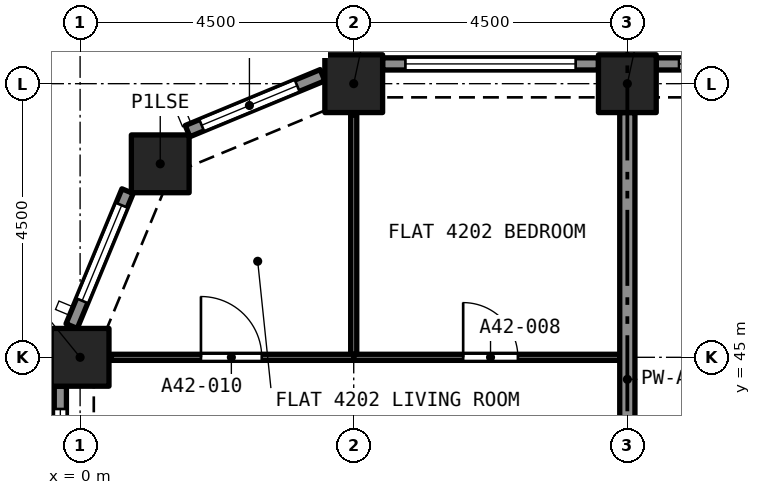
"""IFC4 building model, lengths in metres.
Left out: names, types, materials, properties, quantities, classifications, styles, units other than length and angle.
Written with IfcOpenShell. Run it as: python <this file> out.ifc"""

import sys

from ifc_helpers import new_model, si_unit, direction, frame, frame_2d, origin, origin_2d, place, context, subcontext, project, spatial, rectangle, extrude, element, fill, save


model = new_model("IFC4")
c1 = context("Model", 3, precision=1e-05, world=origin(), true_north=direction((0.0, 1.0)))
c2 = subcontext(c1, "Body", "Model", "MODEL_VIEW")
j1 = project(units=[si_unit("LENGTHUNIT", "METRE"), si_unit("PLANEANGLEUNIT", "RADIAN")], contexts=[c1])
p1 = place(None, origin())
s1 = spatial("IfcSite", under=j1, at=p1, CompositionType="ELEMENT")
p2 = place(p1, origin())
s2 = spatial("IfcBuilding", under=s1, at=p2, CompositionType="ELEMENT")
p3 = place(p2, frame((0.0, 0.0, 150.6)))
s3 = spatial("IfcBuildingStorey", under=s2, at=p3, CompositionType="ELEMENT", Elevation=150.6)
for number, where, z_axis, x_axis in (
    (1, (0.0, 45.0, 0.0), (0.0, 0.0, 1.0), (1.0, 0.0, 0.0)),
    (2, (1.318, 48.182, 0.0), (0.0, 0.0, 1.0), (1.0, 0.0, 0.0)),
    (3, (4.5, 49.5, 0.0), (0.0, 0.0, 1.0), (1.0, 0.0, 0.0)),
    (4, (9.0, 49.5, 0.0), (0.0, 0.0, 1.0), (1.0, 0.0, 0.0)),
):
    element("IfcColumn", number, at=place(p3, frame(where, z_axis=z_axis, x_axis=x_axis)), inside=s3, PredefinedType="COLUMN", context=c2, shape_type="SweptSolid", body=[
        extrude(rectangle(XDim=0.95, YDim=0.95, at=origin_2d()), origin(), (0.0, 0.0, 1.0), 4.4),
    ])
p4 = place(p3, frame((9.475, 49.825, 0.0), z_axis=(0.0, 0.0, 1.0), x_axis=(1.0, 0.0, 0.0)))
e5 = element("IfcWall", 5, at=p4, inside=s3, PredefinedType="SOLIDWALL", context=c2, shape_type="SweptSolid", body=[
    extrude(rectangle(XDim=3.55, YDim=0.2, at=frame_2d((1.775, 0.0))), origin(), (0.0, 0.0, 1.0), 4.4),
])
p5 = place(p4, frame((0.375, 0.0, 0.45)))
e6 = element("IfcOpeningElement", 6, at=p5, cuts=e5, PredefinedType="OPENING", context=c2, shape_type="SweptSolid", body=[
    extrude(rectangle(XDim=2.8, YDim=2.55, at=frame_2d((1.4, 1.275))), frame((0.0, 0.11, 0.0), z_axis=(0.0, -1.0, 0.0), x_axis=(1.0, 0.0, 0.0)), (0.0, 0.0, 1.0), 0.22),
])
p6 = place(p3, frame((4.975, 49.825, 0.0), z_axis=(0.0, 0.0, 1.0), x_axis=(1.0, 0.0, 0.0)))
e7 = element("IfcWall", 7, at=p6, inside=s3, PredefinedType="SOLIDWALL", context=c2, shape_type="SweptSolid", body=[
    extrude(rectangle(XDim=3.55, YDim=0.2, at=frame_2d((1.775, 0.0))), origin(), (0.0, 0.0, 1.0), 4.4),
])
p7 = place(p6, frame((0.375, 0.0, 0.45)))
e8 = element("IfcOpeningElement", 8, at=p7, cuts=e7, PredefinedType="OPENING", context=c2, shape_type="SweptSolid", body=[
    extrude(rectangle(XDim=2.8, YDim=2.55, at=frame_2d((1.4, 1.275))), frame((0.0, 0.11, 0.0), z_axis=(0.0, -1.0, 0.0), x_axis=(1.0, 0.0, 0.0)), (0.0, 0.0, 1.0), 0.22),
])
p8 = place(p3, frame((1.767, 48.72, 0.0), z_axis=(0.0, 0.0, 1.0), x_axis=(0.923880599843, 0.382680855588, 0.0)))
e9 = element("IfcWall", 9, at=p8, inside=s3, PredefinedType="SOLIDWALL", context=c2, shape_type="SweptSolid", body=[
    extrude(rectangle(XDim=2.403, YDim=0.2, at=frame_2d((1.201, 0.0))), origin(), (0.0, 0.0, 1.0), 4.4),
])
p9 = place(p8, frame((0.251, 0.0, 0.45)))
e10 = element("IfcOpeningElement", 10, at=p9, cuts=e9, PredefinedType="OPENING", context=c2, shape_type="SweptSolid", body=[
    extrude(rectangle(XDim=1.7, YDim=2.55, at=frame_2d((0.85, 1.275))), frame((0.0, 0.11, 0.0), z_axis=(0.0, -1.0, 0.0), x_axis=(1.0, 0.0, 0.0)), (0.0, 0.0, 1.0), 0.22),
])
p10 = place(p3, frame((-0.139, 45.513, 0.0), z_axis=(0.0, 0.0, 1.0), x_axis=(0.382680855588, 0.923880599843, 0.0)))
e11 = element("IfcWall", 11, at=p10, inside=s3, PredefinedType="SOLIDWALL", context=c2, shape_type="SweptSolid", body=[
    extrude(rectangle(XDim=2.403, YDim=0.2, at=frame_2d((1.201, 0.0))), origin(), (0.0, 0.0, 1.0), 4.4),
])
p11 = place(p10, frame((0.451, 0.0, 0.45)))
e12 = element("IfcOpeningElement", 12, at=p11, cuts=e11, PredefinedType="OPENING", context=c2, shape_type="SweptSolid", body=[
    extrude(rectangle(XDim=1.7, YDim=2.55, at=frame_2d((0.85, 1.275))), frame((0.0, 0.11, 0.0), z_axis=(0.0, -1.0, 0.0), x_axis=(1.0, 0.0, 0.0)), (0.0, 0.0, 1.0), 0.22),
])
p12 = place(p3, frame((-0.325, 40.975, 0.0), z_axis=(0.0, 0.0, 1.0), x_axis=(0.0, 1.0, 0.0)))
e13 = element("IfcWall", 13, at=p12, inside=s3, PredefinedType="SOLIDWALL", context=c2, shape_type="SweptSolid", body=[
    extrude(rectangle(XDim=3.55, YDim=0.2, at=frame_2d((1.775, 0.0))), origin(), (0.0, 0.0, 1.0), 4.4),
])
p13 = place(p12, frame((0.375, 0.0, 0.45)))
e14 = element("IfcOpeningElement", 14, at=p13, cuts=e13, PredefinedType="OPENING", context=c2, shape_type="SweptSolid", body=[
    extrude(rectangle(XDim=2.8, YDim=2.55, at=frame_2d((1.4, 1.275))), frame((0.0, 0.11, 0.0), z_axis=(0.0, -1.0, 0.0), x_axis=(1.0, 0.0, 0.0)), (0.0, 0.0, 1.0), 0.22),
])
p14 = place(p3, frame((4.5, 45.0, 0.0), z_axis=(0.0, 0.0, 1.0), x_axis=(1.0, 0.0, 0.0)))
e15 = element("IfcWall", 15, at=p14, inside=s3, PredefinedType="PARTITIONING", context=c2, shape_type="SweptSolid", body=[
    extrude(rectangle(XDim=4.375, YDim=0.1, at=frame_2d((2.188, 0.0))), origin(), (0.0, 0.0, 1.0), 4.1),
])
p15 = place(p14, frame((1.8, 0.0, 0.0)))
e16 = element("IfcOpeningElement", 16, at=p15, cuts=e15, PredefinedType="OPENING", context=c2, shape_type="SweptSolid", body=[
    extrude(rectangle(XDim=0.9, YDim=2.1, at=frame_2d((0.45, 1.05))), frame((0.0, 0.06, 0.0), z_axis=(0.0, -1.0, 0.0), x_axis=(1.0, 0.0, 0.0)), (0.0, 0.0, 1.0), 0.12),
])
p16 = place(p3, frame((4.5, 45.05, 0.0), z_axis=(0.0, 0.0, 1.0), x_axis=(0.0, 1.0, 0.0)))
e17 = element("IfcWall", 17, at=p16, inside=s3, PredefinedType="PARTITIONING", context=c2, shape_type="SweptSolid", body=[
    extrude(rectangle(XDim=3.936, YDim=0.1, at=frame_2d((1.968, 0.0))), origin(), (0.0, 0.0, 1.0), 4.1),
])
p17 = place(p3, frame((0.514, 45.0, 0.0), z_axis=(0.0, 0.0, 1.0), x_axis=(1.0, 0.0, 0.0)))
e18 = element("IfcWall", 18, at=p17, inside=s3, PredefinedType="PARTITIONING", context=c2, shape_type="SweptSolid", body=[
    extrude(rectangle(XDim=3.986, YDim=0.1, at=frame_2d((1.993, 0.0))), origin(), (0.0, 0.0, 1.0), 4.1),
])
p18 = place(p17, frame((1.473, 0.0, 0.0)))
e19 = element("IfcOpeningElement", 19, at=p18, cuts=e18, PredefinedType="OPENING", context=c2, shape_type="SweptSolid", body=[
    extrude(rectangle(XDim=1.0, YDim=2.1, at=frame_2d((0.5, 1.05))), frame((0.0, 0.06, 0.0), z_axis=(0.0, -1.0, 0.0), x_axis=(1.0, 0.0, 0.0)), (0.0, 0.0, 1.0), 0.12),
])
p19 = place(p3, frame((9.0, 40.25, 0.0), z_axis=(0.0, 0.0, 1.0), x_axis=(0.0, 1.0, 0.0)))
e20 = element("IfcWall", 20, at=p19, inside=s3, PredefinedType="PARTITIONING", context=c2, shape_type="SweptSolid", body=[
    extrude(rectangle(XDim=8.775, YDim=0.25, at=frame_2d((4.387, 0.0))), origin(), (0.0, 0.0, 1.0), 4.1),
])
p20 = place(p5, origin())
e21 = element("IfcWindow", 21, at=p20, inside=s3, PartitioningType="SINGLE_PANEL", PredefinedType="WINDOW", context=c2, shape_type="SweptSolid", body=[
    extrude(rectangle(XDim=2.8, YDim=2.55, at=frame_2d((1.4, 1.275))), frame((0.0, 0.03, 0.0), z_axis=(0.0, -1.0, 0.0), x_axis=(1.0, 0.0, 0.0)), (0.0, 0.0, 1.0), 0.06),
])
fill(e6, e21)
p21 = place(p7, origin())
e22 = element("IfcWindow", 22, at=p21, inside=s3, PartitioningType="SINGLE_PANEL", PredefinedType="WINDOW", context=c2, shape_type="SweptSolid", body=[
    extrude(rectangle(XDim=2.8, YDim=2.55, at=frame_2d((1.4, 1.275))), frame((0.0, 0.03, 0.0), z_axis=(0.0, -1.0, 0.0), x_axis=(1.0, 0.0, 0.0)), (0.0, 0.0, 1.0), 0.06),
])
fill(e8, e22)
p22 = place(p9, origin())
e23 = element("IfcWindow", 23, at=p22, inside=s3, PartitioningType="SINGLE_PANEL", PredefinedType="WINDOW", context=c2, shape_type="SweptSolid", body=[
    extrude(rectangle(XDim=1.7, YDim=2.55, at=frame_2d((0.85, 1.275))), frame((0.0, 0.03, 0.0), z_axis=(0.0, -1.0, 0.0), x_axis=(1.0, 0.0, 0.0)), (0.0, 0.0, 1.0), 0.06),
])
fill(e10, e23)
p23 = place(p11, origin())
e24 = element("IfcWindow", 24, at=p23, inside=s3, PartitioningType="SINGLE_PANEL", PredefinedType="WINDOW", context=c2, shape_type="SweptSolid", body=[
    extrude(rectangle(XDim=1.7, YDim=2.55, at=frame_2d((0.85, 1.275))), frame((0.0, 0.03, 0.0), z_axis=(0.0, -1.0, 0.0), x_axis=(1.0, 0.0, 0.0)), (0.0, 0.0, 1.0), 0.06),
])
fill(e12, e24)
p24 = place(p13, origin())
e25 = element("IfcWindow", 25, at=p24, inside=s3, PartitioningType="SINGLE_PANEL", PredefinedType="WINDOW", context=c2, shape_type="SweptSolid", body=[
    extrude(rectangle(XDim=2.8, YDim=2.55, at=frame_2d((1.4, 1.275))), frame((0.0, 0.03, 0.0), z_axis=(0.0, -1.0, 0.0), x_axis=(1.0, 0.0, 0.0)), (0.0, 0.0, 1.0), 0.06),
])
fill(e14, e25)
p25 = place(p15, origin())
e26 = element("IfcDoor", 26, at=p25, inside=s3, OperationType="SINGLE_SWING_RIGHT", PredefinedType="DOOR", context=c2, shape_type="SweptSolid", body=[
    extrude(rectangle(XDim=0.9, YDim=2.1, at=frame_2d((0.45, 1.05))), frame((0.0, 0.025, 0.0), z_axis=(0.0, -1.0, 0.0), x_axis=(1.0, 0.0, 0.0)), (0.0, 0.0, 1.0), 0.05),
])
fill(e16, e26)
p26 = place(p18, origin())
e27 = element("IfcDoor", 27, at=p26, inside=s3, OperationType="SINGLE_SWING_LEFT", PredefinedType="DOOR", context=c2, shape_type="SweptSolid", body=[
    extrude(rectangle(XDim=1.0, YDim=2.1, at=frame_2d((0.5, 1.05))), frame((0.0, 0.025, 0.0), z_axis=(0.0, -1.0, 0.0), x_axis=(1.0, 0.0, 0.0)), (0.0, 0.0, 1.0), 0.05),
])
fill(e19, e27)
save(model, sys.argv[1])
